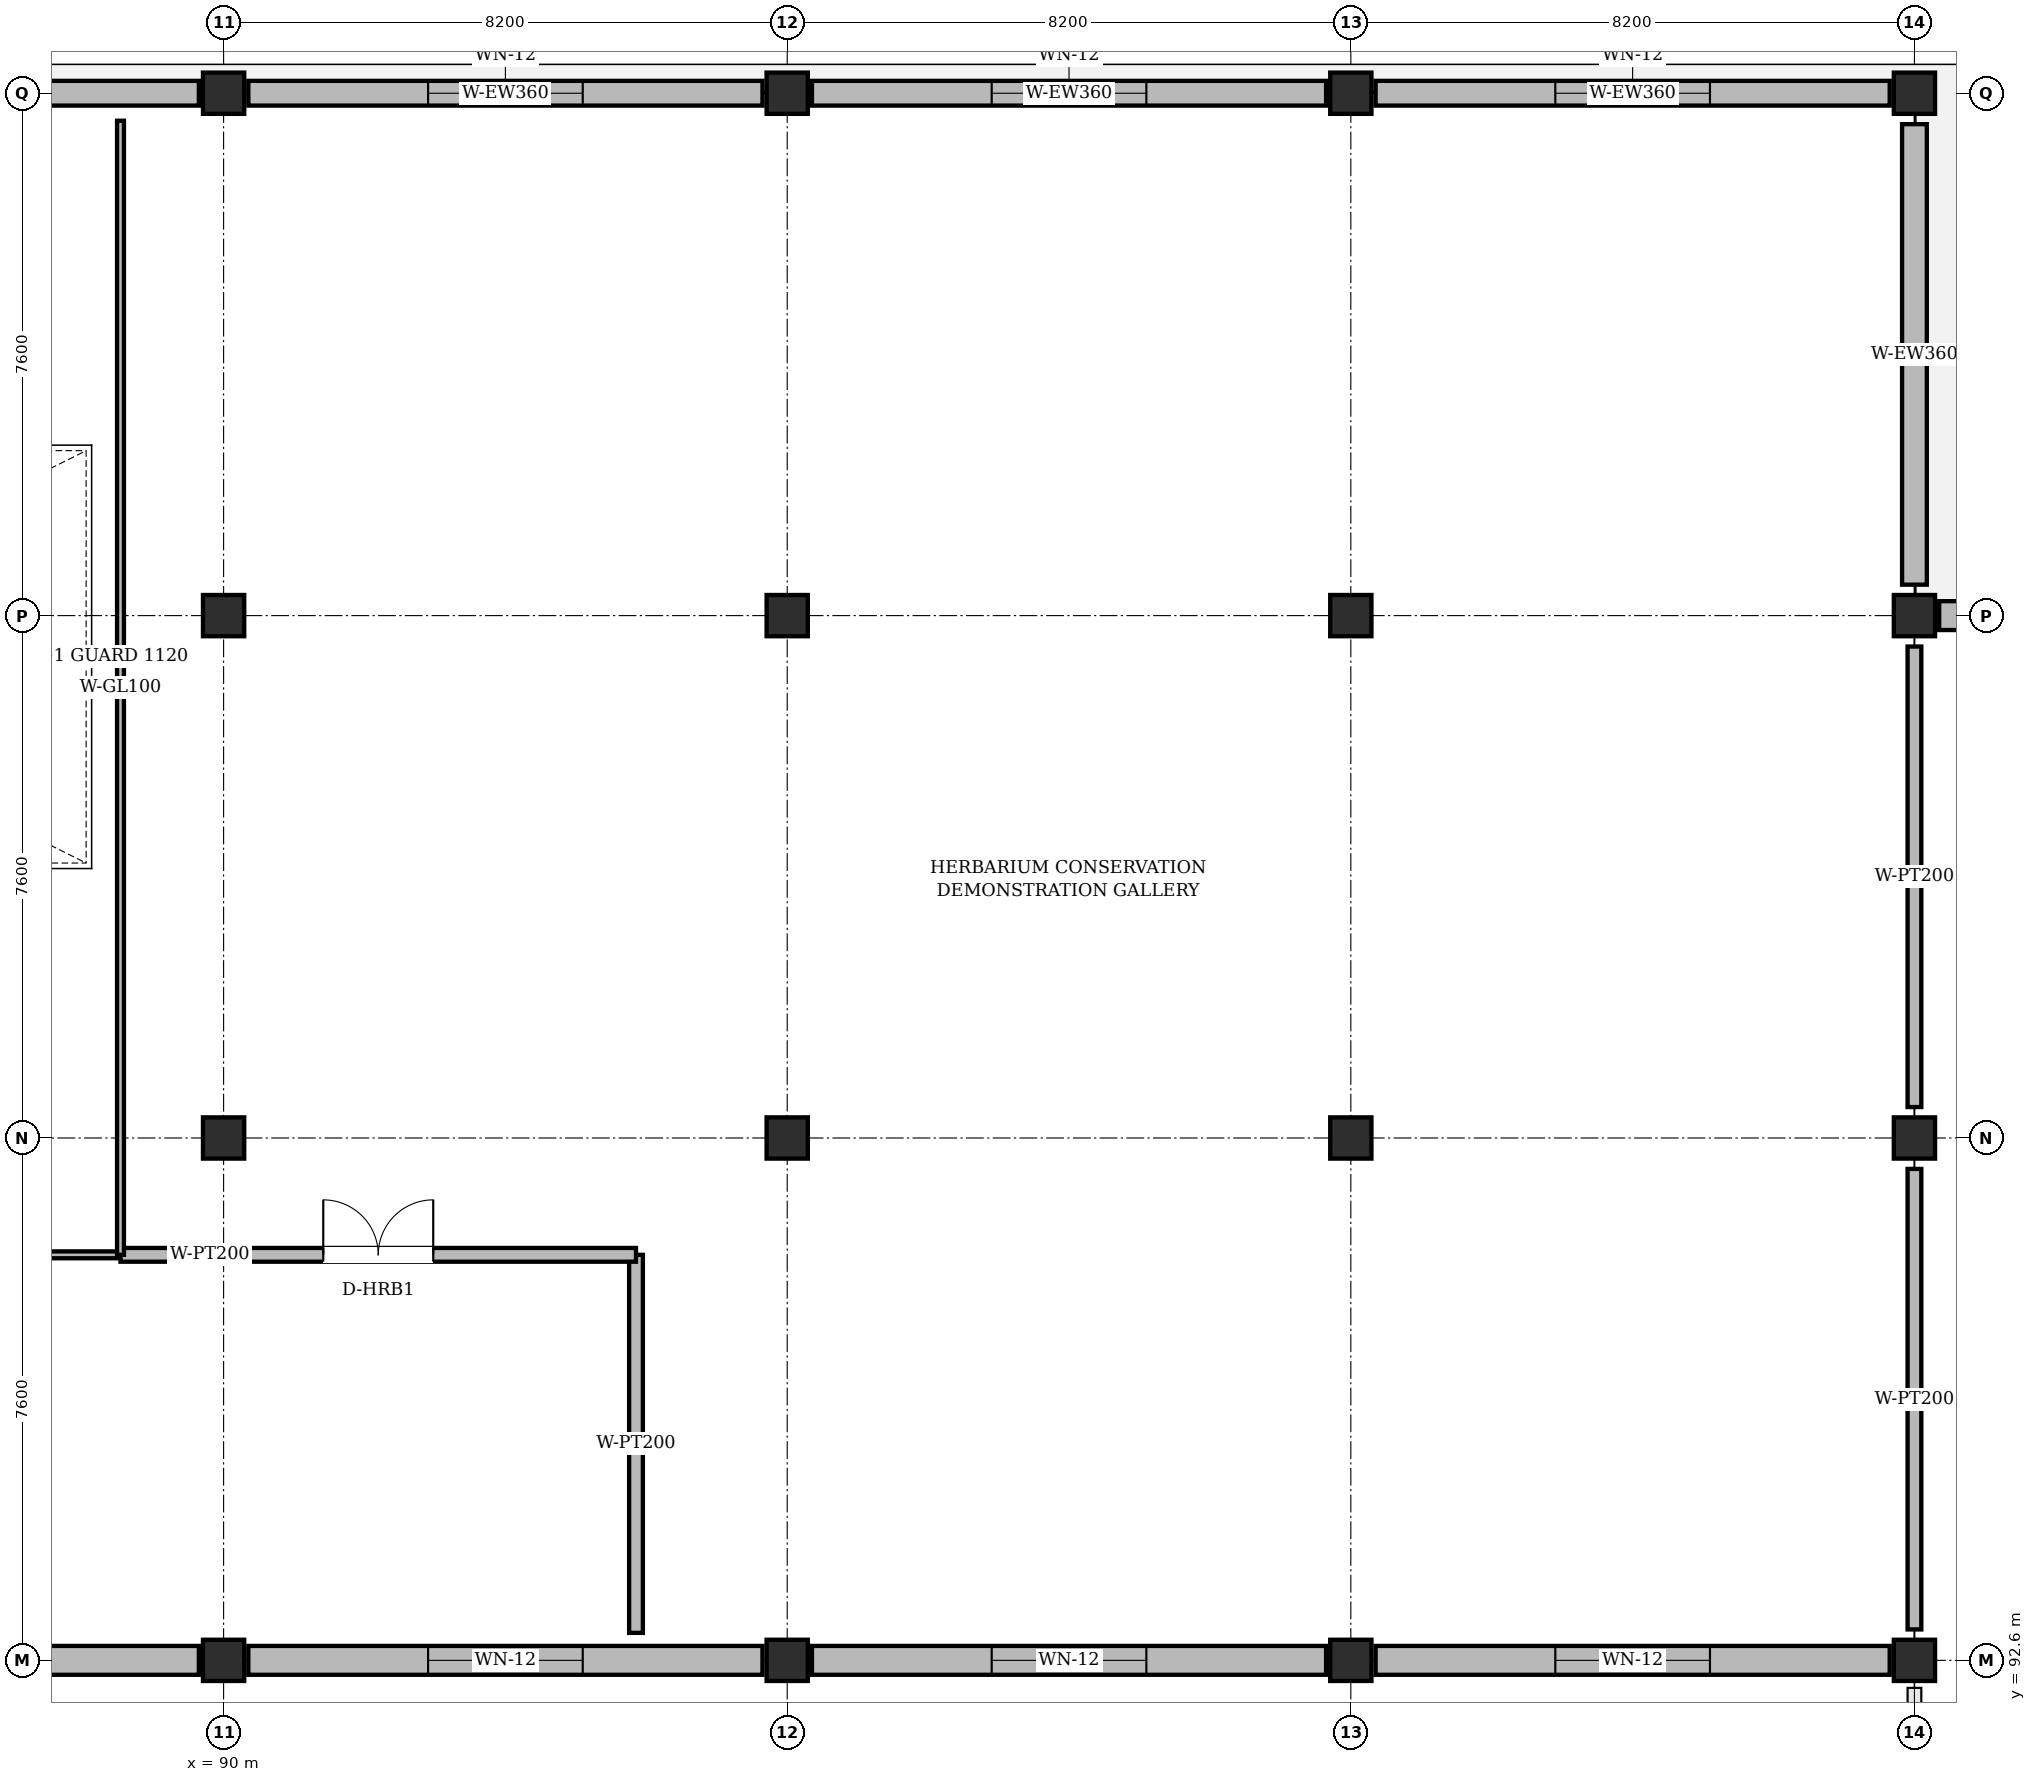
"""IFC4 building model, lengths in metres.
Left out: names, types, materials, properties, quantities, classifications, styles, units other than length and angle.
Written with IfcOpenShell. Run it as: python <this file> out.ifc"""

import sys

from ifc_helpers import new_model, si_unit, direction, frame, frame_2d, origin, origin_2d, place, context, subcontext, project, spatial, rectangle, extrude, element, fill, save


model = new_model("IFC4")
c1 = context("Model", 3, precision=1e-05, world=origin(), true_north=direction((0.0, 1.0)))
c2 = subcontext(c1, "Body", "Model", "MODEL_VIEW")
j1 = project(units=[si_unit("LENGTHUNIT", "METRE"), si_unit("PLANEANGLEUNIT", "RADIAN")], contexts=[c1])
p1 = place(None, origin())
s1 = spatial("IfcSite", under=j1, at=p1, CompositionType="ELEMENT")
p2 = place(p1, origin())
s2 = spatial("IfcBuilding", under=s1, at=p2, CompositionType="ELEMENT")
p3 = place(p2, frame((0.0, 0.0, 5.4)))
s3 = spatial("IfcBuildingStorey", under=s2, at=p3, CompositionType="ELEMENT", Elevation=5.4)
for number, where, z_axis, x_axis in (
    (1, (90.0, 92.6, 0.0), (0.0, 0.0, 1.0), (1.0, 0.0, 0.0)),
    (2, (90.0, 100.2, 0.0), (0.0, 0.0, 1.0), (1.0, 0.0, 0.0)),
):
    element("IfcColumn", number, at=place(p3, frame(where, z_axis=z_axis, x_axis=x_axis)), inside=s3, PredefinedType="COLUMN", context=c2, shape_type="SweptSolid", body=[
        extrude(rectangle(XDim=0.6, YDim=0.6, at=origin_2d()), origin(), (0.0, 0.0, 1.0), 4.585),
    ])
for number, where, z_axis, x_axis in (
    (3, (90.0, 107.8, 0.0), (0.0, 0.0, 1.0), (1.0, 0.0, 0.0)),
    (4, (90.0, 115.4, 0.0), (0.0, 0.0, 1.0), (1.0, 0.0, 0.0)),
):
    element("IfcColumn", number, at=place(p3, frame(where, z_axis=z_axis, x_axis=x_axis)), inside=s3, PredefinedType="COLUMN", context=c2, shape_type="SweptSolid", body=[
        extrude(rectangle(XDim=0.6, YDim=0.6, at=origin_2d()), origin(), (0.0, 0.0, 1.0), 4.42),
    ])
for number, where, z_axis, x_axis in (
    (5, (98.2, 92.6, 0.0), (0.0, 0.0, 1.0), (1.0, 0.0, 0.0)),
    (6, (98.2, 100.2, 0.0), (0.0, 0.0, 1.0), (1.0, 0.0, 0.0)),
):
    element("IfcColumn", number, at=place(p3, frame(where, z_axis=z_axis, x_axis=x_axis)), inside=s3, PredefinedType="COLUMN", context=c2, shape_type="SweptSolid", body=[
        extrude(rectangle(XDim=0.6, YDim=0.6, at=origin_2d()), origin(), (0.0, 0.0, 1.0), 4.585),
    ])
for number, where, z_axis, x_axis in (
    (7, (98.2, 107.8, 0.0), (0.0, 0.0, 1.0), (1.0, 0.0, 0.0)),
    (8, (98.2, 115.4, 0.0), (0.0, 0.0, 1.0), (1.0, 0.0, 0.0)),
):
    element("IfcColumn", number, at=place(p3, frame(where, z_axis=z_axis, x_axis=x_axis)), inside=s3, PredefinedType="COLUMN", context=c2, shape_type="SweptSolid", body=[
        extrude(rectangle(XDim=0.6, YDim=0.6, at=origin_2d()), origin(), (0.0, 0.0, 1.0), 4.42),
    ])
for number, where, z_axis, x_axis in (
    (9, (106.4, 92.6, 0.0), (0.0, 0.0, 1.0), (1.0, 0.0, 0.0)),
    (10, (106.4, 100.2, 0.0), (0.0, 0.0, 1.0), (1.0, 0.0, 0.0)),
):
    element("IfcColumn", number, at=place(p3, frame(where, z_axis=z_axis, x_axis=x_axis)), inside=s3, PredefinedType="COLUMN", context=c2, shape_type="SweptSolid", body=[
        extrude(rectangle(XDim=0.6, YDim=0.6, at=origin_2d()), origin(), (0.0, 0.0, 1.0), 4.585),
    ])
for number, where, z_axis, x_axis in (
    (11, (106.4, 107.8, 0.0), (0.0, 0.0, 1.0), (1.0, 0.0, 0.0)),
    (12, (106.4, 115.4, 0.0), (0.0, 0.0, 1.0), (1.0, 0.0, 0.0)),
):
    element("IfcColumn", number, at=place(p3, frame(where, z_axis=z_axis, x_axis=x_axis)), inside=s3, PredefinedType="COLUMN", context=c2, shape_type="SweptSolid", body=[
        extrude(rectangle(XDim=0.6, YDim=0.6, at=origin_2d()), origin(), (0.0, 0.0, 1.0), 4.42),
    ])
p4 = place(p3, frame((114.6, 92.6, 0.0), z_axis=(0.0, 0.0, 1.0), x_axis=(1.0, 0.0, 0.0)))
e13 = element("IfcColumn", 13, at=p4, inside=s3, PredefinedType="COLUMN", context=c2, shape_type="SweptSolid", body=[
    extrude(rectangle(XDim=0.6, YDim=0.6, at=origin_2d()), origin(), (0.0, 0.0, 1.0), 4.585),
])
p5 = place(p3, frame((114.6, 100.2, 0.0), z_axis=(0.0, 0.0, 1.0), x_axis=(1.0, 0.0, 0.0)))
e14 = element("IfcColumn", 14, at=p5, inside=s3, PredefinedType="COLUMN", context=c2, shape_type="SweptSolid", body=[
    extrude(rectangle(XDim=0.6, YDim=0.6, at=origin_2d()), origin(), (0.0, 0.0, 1.0), 4.545),
])
for number, where, z_axis, x_axis in (
    (15, (114.6, 107.8, 0.0), (0.0, 0.0, 1.0), (1.0, 0.0, 0.0)),
    (16, (114.6, 115.4, 0.0), (0.0, 0.0, 1.0), (1.0, 0.0, 0.0)),
):
    element("IfcColumn", number, at=place(p3, frame(where, z_axis=z_axis, x_axis=x_axis)), inside=s3, PredefinedType="COLUMN", context=c2, shape_type="SweptSolid", body=[
        extrude(rectangle(XDim=0.6, YDim=0.6, at=origin_2d()), origin(), (0.0, 0.0, 1.0), 4.42),
    ])
p6 = place(p3, frame((82.16, 92.6, 0.0), z_axis=(0.0, 0.0, 1.0), x_axis=(1.0, 0.0, 0.0)))
e17 = element("IfcWall", 17, at=p6, inside=s3, PredefinedType="SOLIDWALL", context=c2, shape_type="SweptSolid", body=[
    extrude(rectangle(XDim=7.48, YDim=0.42, at=frame_2d((3.74, 0.0))), origin(), (0.0, 0.0, 1.0), 3.885),
])
p7 = place(p6, frame((2.615, 0.0, 0.95)))
e18 = element("IfcOpeningElement", 18, at=p7, cuts=e17, PredefinedType="OPENING", context=c2, shape_type="SweptSolid", body=[
    extrude(rectangle(XDim=2.25, YDim=2.1, at=frame_2d((1.125, 1.05))), frame((0.0, 0.222, 0.0), z_axis=(0.0, -1.0, 0.0), x_axis=(1.0, 0.0, 0.0)), (0.0, 0.0, 1.0), 0.444),
])
p8 = place(p3, frame((90.36, 92.6, 0.0), z_axis=(0.0, 0.0, 1.0), x_axis=(1.0, 0.0, 0.0)))
e19 = element("IfcWall", 19, at=p8, inside=s3, PredefinedType="SOLIDWALL", context=c2, shape_type="SweptSolid", body=[
    extrude(rectangle(XDim=7.48, YDim=0.42, at=frame_2d((3.74, 0.0))), origin(), (0.0, 0.0, 1.0), 3.885),
])
p9 = place(p8, frame((2.615, 0.0, 0.95)))
e20 = element("IfcOpeningElement", 20, at=p9, cuts=e19, PredefinedType="OPENING", context=c2, shape_type="SweptSolid", body=[
    extrude(rectangle(XDim=2.25, YDim=2.1, at=frame_2d((1.125, 1.05))), frame((0.0, 0.222, 0.0), z_axis=(0.0, -1.0, 0.0), x_axis=(1.0, 0.0, 0.0)), (0.0, 0.0, 1.0), 0.444),
])
p10 = place(p3, frame((98.56, 92.6, 0.0), z_axis=(0.0, 0.0, 1.0), x_axis=(1.0, 0.0, 0.0)))
e21 = element("IfcWall", 21, at=p10, inside=s3, PredefinedType="SOLIDWALL", context=c2, shape_type="SweptSolid", body=[
    extrude(rectangle(XDim=7.48, YDim=0.42, at=frame_2d((3.74, 0.0))), origin(), (0.0, 0.0, 1.0), 3.885),
])
p11 = place(p10, frame((2.615, 0.0, 0.95)))
e22 = element("IfcOpeningElement", 22, at=p11, cuts=e21, PredefinedType="OPENING", context=c2, shape_type="SweptSolid", body=[
    extrude(rectangle(XDim=2.25, YDim=2.1, at=frame_2d((1.125, 1.05))), frame((0.0, 0.222, 0.0), z_axis=(0.0, -1.0, 0.0), x_axis=(1.0, 0.0, 0.0)), (0.0, 0.0, 1.0), 0.444),
])
p12 = place(p3, frame((106.76, 92.6, 0.0), z_axis=(0.0, 0.0, 1.0), x_axis=(1.0, 0.0, 0.0)))
e23 = element("IfcWall", 23, at=p12, inside=s3, PredefinedType="SOLIDWALL", context=c2, shape_type="SweptSolid", body=[
    extrude(rectangle(XDim=7.48, YDim=0.42, at=frame_2d((3.74, 0.0))), origin(), (0.0, 0.0, 1.0), 3.885),
])
p13 = place(p12, frame((2.615, 0.0, 0.95)))
e24 = element("IfcOpeningElement", 24, at=p13, cuts=e23, PredefinedType="OPENING", context=c2, shape_type="SweptSolid", body=[
    extrude(rectangle(XDim=2.25, YDim=2.1, at=frame_2d((1.125, 1.05))), frame((0.0, 0.222, 0.0), z_axis=(0.0, -1.0, 0.0), x_axis=(1.0, 0.0, 0.0)), (0.0, 0.0, 1.0), 0.444),
])
p14 = place(p3, frame((114.24, 115.4, 0.0), z_axis=(0.0, 0.0, 1.0), x_axis=(-1.0, 0.0, 0.0)))
e25 = element("IfcWall", 25, at=p14, inside=s3, PredefinedType="SOLIDWALL", context=c2, shape_type="SweptSolid", body=[
    extrude(rectangle(XDim=7.48, YDim=0.36, at=frame_2d((3.74, 0.0))), origin(), (0.0, 0.0, 1.0), 3.805),
])
p15 = place(p14, frame((2.615, 0.0, 0.95)))
e26 = element("IfcOpeningElement", 26, at=p15, cuts=e25, PredefinedType="OPENING", context=c2, shape_type="SweptSolid", body=[
    extrude(rectangle(XDim=2.25, YDim=2.1, at=frame_2d((1.125, 1.05))), frame((0.0, 0.192, 0.0), z_axis=(0.0, -1.0, 0.0), x_axis=(1.0, 0.0, 0.0)), (0.0, 0.0, 1.0), 0.384),
])
p16 = place(p3, frame((106.04, 115.4, 0.0), z_axis=(0.0, 0.0, 1.0), x_axis=(-1.0, 0.0, 0.0)))
e27 = element("IfcWall", 27, at=p16, inside=s3, PredefinedType="SOLIDWALL", context=c2, shape_type="SweptSolid", body=[
    extrude(rectangle(XDim=7.48, YDim=0.36, at=frame_2d((3.74, 0.0))), origin(), (0.0, 0.0, 1.0), 3.805),
])
p17 = place(p16, frame((2.615, 0.0, 0.95)))
e28 = element("IfcOpeningElement", 28, at=p17, cuts=e27, PredefinedType="OPENING", context=c2, shape_type="SweptSolid", body=[
    extrude(rectangle(XDim=2.25, YDim=2.1, at=frame_2d((1.125, 1.05))), frame((0.0, 0.192, 0.0), z_axis=(0.0, -1.0, 0.0), x_axis=(1.0, 0.0, 0.0)), (0.0, 0.0, 1.0), 0.384),
])
p18 = place(p3, frame((97.84, 115.4, 0.0), z_axis=(0.0, 0.0, 1.0), x_axis=(-1.0, 0.0, 0.0)))
e29 = element("IfcWall", 29, at=p18, inside=s3, PredefinedType="SOLIDWALL", context=c2, shape_type="SweptSolid", body=[
    extrude(rectangle(XDim=7.48, YDim=0.36, at=frame_2d((3.74, 0.0))), origin(), (0.0, 0.0, 1.0), 3.805),
])
p19 = place(p18, frame((2.615, 0.0, 0.95)))
e30 = element("IfcOpeningElement", 30, at=p19, cuts=e29, PredefinedType="OPENING", context=c2, shape_type="SweptSolid", body=[
    extrude(rectangle(XDim=2.25, YDim=2.1, at=frame_2d((1.125, 1.05))), frame((0.0, 0.192, 0.0), z_axis=(0.0, -1.0, 0.0), x_axis=(1.0, 0.0, 0.0)), (0.0, 0.0, 1.0), 0.384),
])
p20 = place(p3, frame((89.64, 115.4, 0.0), z_axis=(0.0, 0.0, 1.0), x_axis=(-1.0, 0.0, 0.0)))
e31 = element("IfcWall", 31, at=p20, inside=s3, PredefinedType="SOLIDWALL", context=c2, shape_type="SweptSolid", body=[
    extrude(rectangle(XDim=7.48, YDim=0.36, at=frame_2d((3.74, 0.0))), origin(), (0.0, 0.0, 1.0), 3.805),
])
p21 = place(p20, frame((2.615, 0.0, 0.95)))
e32 = element("IfcOpeningElement", 32, at=p21, cuts=e31, PredefinedType="OPENING", context=c2, shape_type="SweptSolid", body=[
    extrude(rectangle(XDim=2.25, YDim=2.1, at=frame_2d((1.125, 1.05))), frame((0.0, 0.192, 0.0), z_axis=(0.0, -1.0, 0.0), x_axis=(1.0, 0.0, 0.0)), (0.0, 0.0, 1.0), 0.384),
])
p22 = place(p3, frame((122.44, 107.8, 0.0), z_axis=(0.0, 0.0, 1.0), x_axis=(-1.0, 0.0, 0.0)))
e33 = element("IfcWall", 33, at=p22, inside=s3, PredefinedType="SOLIDWALL", context=c2, shape_type="SweptSolid", body=[
    extrude(rectangle(XDim=7.48, YDim=0.42, at=frame_2d((3.74, 0.0))), origin(), (0.0, 0.0, 1.0), 3.93),
])
p23 = place(p22, frame((2.415, 0.0, 0.95)))
e34 = element("IfcOpeningElement", 34, at=p23, cuts=e33, PredefinedType="OPENING", context=c2, shape_type="SweptSolid", body=[
    extrude(rectangle(XDim=2.65, YDim=1.75, at=frame_2d((1.325, 0.875))), frame((0.0, 0.222, 0.0), z_axis=(0.0, -1.0, 0.0), x_axis=(1.0, 0.0, 0.0)), (0.0, 0.0, 1.0), 0.444),
])
p24 = place(p3, frame((114.6, 93.05, 0.0), z_axis=(0.0, 0.0, 1.0), x_axis=(0.0, 1.0, 0.0)))
e35 = element("IfcWall", 35, at=p24, inside=s3, PredefinedType="PARTITIONING", context=c2, shape_type="SweptSolid", body=[
    extrude(rectangle(XDim=6.7, YDim=0.2, at=frame_2d((3.35, 0.0))), origin(), (0.0, 0.0, 1.0), 3.82),
])
p25 = place(p3, frame((114.6, 100.65, 0.0), z_axis=(0.0, 0.0, 1.0), x_axis=(0.0, 1.0, 0.0)))
e36 = element("IfcWall", 36, at=p25, inside=s3, PredefinedType="PARTITIONING", context=c2, shape_type="SweptSolid", body=[
    extrude(rectangle(XDim=6.7, YDim=0.2, at=frame_2d((3.35, 0.0))), origin(), (0.0, 0.0, 1.0), 3.805),
])
p26 = place(p3, frame((114.6, 108.25, 0.0), z_axis=(0.0, 0.0, 1.0), x_axis=(0.0, 1.0, 0.0)))
e37 = element("IfcWall", 37, at=p26, inside=s3, PredefinedType="SOLIDWALL", context=c2, shape_type="SweptSolid", body=[
    extrude(rectangle(XDim=6.7, YDim=0.36, at=frame_2d((3.35, 0.0))), origin(), (0.0, 0.0, 1.0), 3.805),
])
p27 = place(p3, frame((69.73, 98.5, 0.0), z_axis=(0.0, 0.0, 1.0), x_axis=(1.0, 0.0, 0.0)))
e38 = element("IfcWall", 38, at=p27, inside=s3, PredefinedType="PARTITIONING", context=c2, shape_type="SweptSolid", body=[
    extrude(rectangle(XDim=18.77, YDim=0.1, at=frame_2d((9.385, 0.0))), origin(), (0.0, 0.0, 1.0), 4.405),
])
p28 = place(p27, frame((8.485, 0.0, 0.0)))
e39 = element("IfcOpeningElement", 39, at=p28, cuts=e38, PredefinedType="OPENING", context=c2, shape_type="SweptSolid", body=[
    extrude(rectangle(XDim=1.8, YDim=2.4, at=frame_2d((0.9, 1.2))), frame((0.0, 0.062, 0.0), z_axis=(0.0, -1.0, 0.0), x_axis=(1.0, 0.0, 0.0)), (0.0, 0.0, 1.0), 0.124),
])
p29 = place(p3, frame((96.0, 98.5, 0.0), z_axis=(0.0, 0.0, 1.0), x_axis=(0.0, -1.0, 0.0)))
e40 = element("IfcWall", 40, at=p29, inside=s3, PredefinedType="PARTITIONING", context=c2, shape_type="SweptSolid", body=[
    extrude(rectangle(XDim=5.5, YDim=0.2, at=frame_2d((2.75, 0.0))), origin(), (0.0, 0.0, 1.0), 4.405),
])
p30 = place(p3, frame((88.5, 98.5, 0.0), z_axis=(0.0, 0.0, 1.0), x_axis=(1.0, 0.0, 0.0)))
e41 = element("IfcWall", 41, at=p30, inside=s3, PredefinedType="PARTITIONING", context=c2, shape_type="SweptSolid", body=[
    extrude(rectangle(XDim=7.5, YDim=0.2, at=frame_2d((3.75, 0.0))), origin(), (0.0, 0.0, 1.0), 4.405),
])
p31 = place(p30, frame((2.95, 0.0, 0.0)))
e42 = element("IfcOpeningElement", 42, at=p31, cuts=e41, PredefinedType="OPENING", context=c2, shape_type="SweptSolid", body=[
    extrude(rectangle(XDim=1.6, YDim=2.3, at=frame_2d((0.8, 1.15))), frame((0.0, 0.112, 0.0), z_axis=(0.0, -1.0, 0.0), x_axis=(1.0, 0.0, 0.0)), (0.0, 0.0, 1.0), 0.224),
])
p32 = place(p3, frame((88.5, 115.0, 0.0), z_axis=(0.0, 0.0, 1.0), x_axis=(0.0, -1.0, 0.0)))
e43 = element("IfcWall", 43, at=p32, inside=s3, PredefinedType="PARTITIONING", context=c2, shape_type="SweptSolid", body=[
    extrude(rectangle(XDim=16.5, YDim=0.1, at=frame_2d((8.25, 0.0))), origin(), (0.0, 0.0, 1.0), 4.405),
])
p33 = place(p9, origin())
e44 = element("IfcWindow", 44, at=p33, inside=s3, PartitioningType="DOUBLE_PANEL_VERTICAL", PredefinedType="WINDOW", context=c2, shape_type="SweptSolid", body=[
    extrude(rectangle(XDim=2.25, YDim=2.1, at=frame_2d((1.125, 1.05))), frame((0.0, 0.03, 0.0), z_axis=(0.0, -1.0, 0.0), x_axis=(1.0, 0.0, 0.0)), (0.0, 0.0, 1.0), 0.06),
])
fill(e20, e44)
p34 = place(p11, origin())
e45 = element("IfcWindow", 45, at=p34, inside=s3, PartitioningType="DOUBLE_PANEL_VERTICAL", PredefinedType="WINDOW", context=c2, shape_type="SweptSolid", body=[
    extrude(rectangle(XDim=2.25, YDim=2.1, at=frame_2d((1.125, 1.05))), frame((0.0, 0.03, 0.0), z_axis=(0.0, -1.0, 0.0), x_axis=(1.0, 0.0, 0.0)), (0.0, 0.0, 1.0), 0.06),
])
fill(e22, e45)
p35 = place(p13, origin())
e46 = element("IfcWindow", 46, at=p35, inside=s3, PartitioningType="DOUBLE_PANEL_VERTICAL", PredefinedType="WINDOW", context=c2, shape_type="SweptSolid", body=[
    extrude(rectangle(XDim=2.25, YDim=2.1, at=frame_2d((1.125, 1.05))), frame((0.0, 0.03, 0.0), z_axis=(0.0, -1.0, 0.0), x_axis=(1.0, 0.0, 0.0)), (0.0, 0.0, 1.0), 0.06),
])
fill(e24, e46)
p36 = place(p15, origin())
e47 = element("IfcWindow", 47, at=p36, inside=s3, PartitioningType="DOUBLE_PANEL_VERTICAL", PredefinedType="WINDOW", context=c2, shape_type="SweptSolid", body=[
    extrude(rectangle(XDim=2.25, YDim=2.1, at=frame_2d((1.125, 1.05))), frame((0.0, 0.03, 0.0), z_axis=(0.0, -1.0, 0.0), x_axis=(1.0, 0.0, 0.0)), (0.0, 0.0, 1.0), 0.06),
])
fill(e26, e47)
p37 = place(p17, origin())
e48 = element("IfcWindow", 48, at=p37, inside=s3, PartitioningType="DOUBLE_PANEL_VERTICAL", PredefinedType="WINDOW", context=c2, shape_type="SweptSolid", body=[
    extrude(rectangle(XDim=2.25, YDim=2.1, at=frame_2d((1.125, 1.05))), frame((0.0, 0.03, 0.0), z_axis=(0.0, -1.0, 0.0), x_axis=(1.0, 0.0, 0.0)), (0.0, 0.0, 1.0), 0.06),
])
fill(e28, e48)
p38 = place(p19, origin())
e49 = element("IfcWindow", 49, at=p38, inside=s3, PartitioningType="DOUBLE_PANEL_VERTICAL", PredefinedType="WINDOW", context=c2, shape_type="SweptSolid", body=[
    extrude(rectangle(XDim=2.25, YDim=2.1, at=frame_2d((1.125, 1.05))), frame((0.0, 0.03, 0.0), z_axis=(0.0, -1.0, 0.0), x_axis=(1.0, 0.0, 0.0)), (0.0, 0.0, 1.0), 0.06),
])
fill(e30, e49)
p39 = place(p31, origin())
e50 = element("IfcDoor", 50, at=p39, inside=s3, OperationType="DOUBLE_DOOR_SINGLE_SWING", PredefinedType="DOOR", context=c2, shape_type="SweptSolid", body=[
    extrude(rectangle(XDim=1.6, YDim=2.3, at=frame_2d((0.8, 1.15))), frame((0.0, 0.025, 0.0), z_axis=(0.0, -1.0, 0.0), x_axis=(1.0, 0.0, 0.0)), (0.0, 0.0, 1.0), 0.05),
])
fill(e42, e50)
save(model, sys.argv[1])
